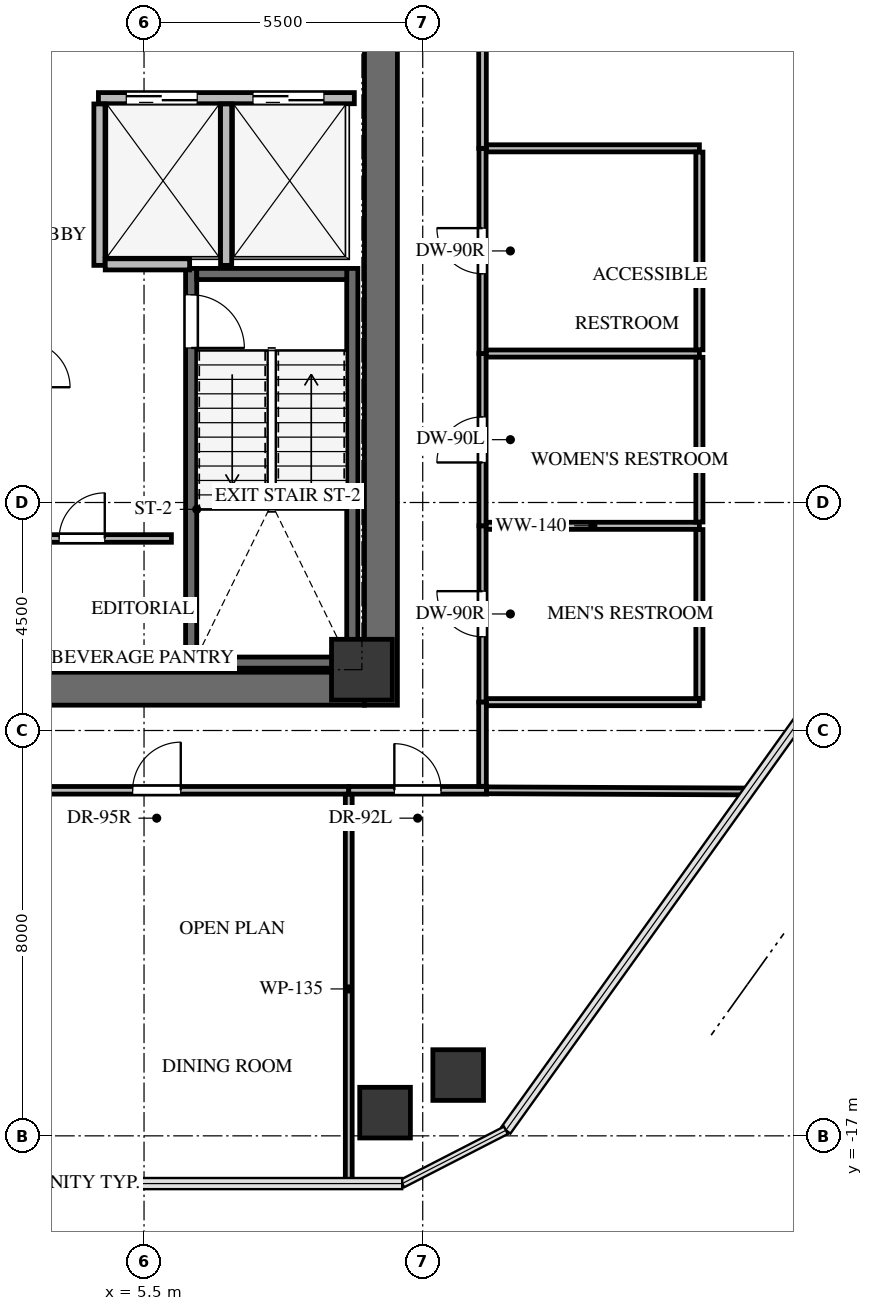
"""IFC4 building model, lengths in metres.
Left out: names, types, materials, properties, quantities, classifications, styles, units other than length and angle.
Written with IfcOpenShell. Run it as: python <this file> out.ifc"""

import sys

from ifc_helpers import new_model, si_unit, direction, frame, frame_2d, origin, origin_2d, place, context, subcontext, project, spatial, rectangle, extrude, source, transform, mapped, element, fill, save


model = new_model("IFC4")
c1 = context("Model", 3, precision=1e-05, world=origin(), true_north=direction((0.0, 1.0)))
c2 = subcontext(c1, "Body", "Model", "MODEL_VIEW")
j1 = project(units=[si_unit("LENGTHUNIT", "METRE"), si_unit("PLANEANGLEUNIT", "RADIAN")], contexts=[c1])
p1 = place(None, origin())
s1 = spatial("IfcSite", under=j1, at=p1, CompositionType="ELEMENT")
p2 = place(p1, origin())
s2 = spatial("IfcBuilding", under=s1, at=p2, CompositionType="ELEMENT")
p3 = place(p2, frame((0.0, 0.0, 155.1)))
s3 = spatial("IfcBuildingStorey", under=s2, at=p3, CompositionType="ELEMENT", Elevation=155.1)
p4 = place(p3, frame((10.175, -8.5, 0.0), z_axis=(0.0, 0.0, 1.0), x_axis=(0.0, 1.0, 0.0)))
e1 = element("IfcWall", 1, at=p4, inside=s3, PredefinedType="SHEAR", context=c2, shape_type="SweptSolid", body=[
    extrude(rectangle(XDim=17.0, YDim=0.65, at=frame_2d((8.5, 0.0))), origin(), (0.0, 0.0, 1.0), 4.2),
])
p5 = place(p3, frame((2.1, -8.175, 0.0), z_axis=(0.0, 0.0, 1.0), x_axis=(1.0, 0.0, 0.0)))
e2 = element("IfcWall", 2, at=p5, inside=s3, PredefinedType="SHEAR", context=c2, shape_type="SweptSolid", body=[
    extrude(rectangle(XDim=7.75, YDim=0.65, at=frame_2d((3.875, 0.0))), origin(), (0.0, 0.0, 1.0), 4.2),
])
p6 = place(p3, frame((9.61, -7.77, -0.32), z_axis=(0.0, 0.0, 1.0), x_axis=(0.0, 1.0, 0.0)))
e3 = element("IfcWall", 3, at=p6, inside=s3, PredefinedType="SHEAR", context=c2, shape_type="SweptSolid", body=[
    extrude(rectangle(XDim=7.89, YDim=0.22, at=frame_2d((3.945, 0.0))), origin(), (0.0, 0.0, 1.0), 4.28),
])
p7 = place(p3, frame((6.43, 0.12, -0.32), z_axis=(0.0, 0.0, 1.0), x_axis=(0.0, -1.0, 0.0)))
e4 = element("IfcWall", 4, at=p7, inside=s3, PredefinedType="SHEAR", context=c2, shape_type="SweptSolid", body=[
    extrude(rectangle(XDim=7.89, YDim=0.22, at=frame_2d((3.945, 0.0))), origin(), (0.0, 0.0, 1.0), 4.28),
])
p8 = place(p7, frame((0.52, 0.0, 0.0)))
e5 = element("IfcOpeningElement", 5, at=p8, cuts=e4, PredefinedType="OPENING", context=c2, shape_type="SweptSolid", body=[
    extrude(rectangle(XDim=1.05, YDim=2.15, at=frame_2d((0.525, 1.075))), frame((0.0, 0.12, 0.0), z_axis=(0.0, -1.0, 0.0), x_axis=(1.0, 0.0, 0.0)), (0.0, 0.0, 1.0), 0.24),
])
for number, where, z_axis, x_axis in (
    (6, (6.54, -7.66, -0.32), (0.0, 0.0, 1.0), (1.0, 0.0, 0.0)),
    (7, (9.5, 0.01, -0.32), (0.0, 0.0, 1.0), (-1.0, 0.0, 0.0)),
):
    element("IfcWall", number, at=place(p3, frame(where, z_axis=z_axis, x_axis=x_axis)), inside=s3, PredefinedType="SHEAR", context=c2, shape_type="SweptSolid", body=[
        extrude(rectangle(XDim=2.96, YDim=0.22, at=frame_2d((1.48, 0.0))), origin(), (0.0, 0.0, 1.0), 4.28),
    ])
m1 = source(origin(), c2, "Body", "SweptSolid", [
    extrude(rectangle(XDim=1.2, YDim=1.2, at=origin_2d()), origin(), (0.0, 0.0, 1.0), 4.28),
])
p9 = place(p3, frame((9.8, -7.8, -0.32), z_axis=(0.0, 0.0, 1.0), x_axis=(1.0, 0.0, 0.0)))
e8 = element("IfcColumn", 8, at=p9, inside=s3, PredefinedType="COLUMN", context=c2, shape_type="MappedRepresentation", body=[
    mapped(m1, transform((0.0, 0.0, 0.0), x_axis=(1.0, 0.0, 0.0), y_axis=(0.0, 1.0, 0.0), z_axis=(0.0, 0.0, 1.0), scale=1.0)),
])
m2 = source(origin(), c2, "Body", "SweptSolid", [
    extrude(rectangle(XDim=1.0, YDim=1.0, at=origin_2d()), origin(), (0.0, 0.0, 1.0), 4.28),
])
for number, where, z_axis, x_axis in (
    (9, (11.7, -15.8, -0.32), (0.0, 0.0, 1.0), (1.0, 0.0, 0.0)),
    (10, (10.257, -16.542, -0.32), (0.0, 0.0, 1.0), (1.0, 0.0, 0.0)),
):
    element("IfcColumn", number, at=place(p3, frame(where, z_axis=z_axis, x_axis=x_axis)), inside=s3, PredefinedType="COLUMN", context=c2, shape_type="MappedRepresentation", body=[
        mapped(m2, transform((0.0, 0.0, 0.0), x_axis=(1.0, 0.0, 0.0), y_axis=(0.0, 1.0, 0.0), z_axis=(0.0, 0.0, 1.0), scale=1.0)),
    ])
p10 = place(p3, frame((4.6, 3.48, 0.0), z_axis=(0.0, 0.0, 1.0), x_axis=(1.0, 0.0, 0.0)))
e11 = element("IfcWall", 11, at=p10, inside=s3, PredefinedType="SOLIDWALL", context=c2, shape_type="SweptSolid", body=[
    extrude(rectangle(XDim=5.05, YDim=0.22, at=frame_2d((2.525, 0.0))), origin(), (0.0, 0.0, 1.0), 3.945),
])
p11 = place(p10, frame((0.55, 0.0, 0.0)))
e12 = element("IfcOpeningElement", 12, at=p11, cuts=e11, PredefinedType="OPENING", context=c2, shape_type="SweptSolid", body=[
    extrude(rectangle(XDim=1.4, YDim=2.15, at=frame_2d((0.7, 1.075))), frame((0.0, 0.12, 0.0), z_axis=(0.0, -1.0, 0.0), x_axis=(1.0, 0.0, 0.0)), (0.0, 0.0, 1.0), 0.24),
])
p12 = place(p10, frame((3.05, 0.0, 0.0)))
e13 = element("IfcOpeningElement", 13, at=p12, cuts=e11, PredefinedType="OPENING", context=c2, shape_type="SweptSolid", body=[
    extrude(rectangle(XDim=1.4, YDim=2.15, at=frame_2d((0.7, 1.075))), frame((0.0, 0.12, 0.0), z_axis=(0.0, -1.0, 0.0), x_axis=(1.0, 0.0, 0.0)), (0.0, 0.0, 1.0), 0.24),
])
for number, where, z_axis, x_axis in (
    (14, (4.62, 0.18, 0.0), (0.0, 0.0, 1.0), (0.0, 1.0, 0.0)),
    (15, (7.12, 0.18, 0.0), (0.0, 0.0, 1.0), (0.0, 1.0, 0.0)),
):
    element("IfcWall", number, at=place(p3, frame(where, z_axis=z_axis, x_axis=x_axis)), inside=s3, PredefinedType="SOLIDWALL", context=c2, shape_type="SweptSolid", body=[
        extrude(rectangle(XDim=3.186, YDim=0.22, at=frame_2d((1.593, 0.0))), origin(), (0.0, 0.0, 1.0), 3.945),
    ])
p13 = place(p3, frame((4.734, 0.2, 0.0), z_axis=(0.0, 0.0, 1.0), x_axis=(1.0, 0.0, 0.0)))
e16 = element("IfcWall", 16, at=p13, inside=s3, PredefinedType="SOLIDWALL", context=c2, shape_type="SweptSolid", body=[
    extrude(rectangle(XDim=1.666, YDim=0.22, at=frame_2d((0.833, 0.0))), origin(), (0.0, 0.0, 1.0), 3.945),
])
p14 = place(p3, frame((2.51, -5.21, 0.0), z_axis=(0.0, 0.0, 1.0), x_axis=(1.0, 0.0, 0.0)))
e17 = element("IfcWall", 17, at=p14, inside=s3, PredefinedType="PARTITIONING", context=c2, shape_type="SweptSolid", body=[
    extrude(rectangle(XDim=3.53, YDim=0.15, at=frame_2d((1.765, 0.0))), origin(), (0.0, 0.0, 1.0), 3.945),
])
p15 = place(p14, frame((1.315, 0.0, 0.0)))
e18 = element("IfcOpeningElement", 18, at=p15, cuts=e17, PredefinedType="OPENING", context=c2, shape_type="SweptSolid", body=[
    extrude(rectangle(XDim=0.9, YDim=2.05, at=frame_2d((0.45, 1.025))), frame((0.0, 0.085, 0.0), z_axis=(0.0, -1.0, 0.0), x_axis=(1.0, 0.0, 0.0)), (0.0, 0.0, 1.0), 0.17),
])
p16 = place(p3, frame((12.18, -8.44, 0.0), z_axis=(0.0, 0.0, 1.0), x_axis=(0.0, 1.0, 0.0)))
e19 = element("IfcWall", 19, at=p16, inside=s3, PredefinedType="PARTITIONING", context=c2, shape_type="SweptSolid", body=[
    extrude(rectangle(XDim=3.48, YDim=0.14, at=frame_2d((1.74, 0.0))), origin(), (0.0, 0.0, 1.0), 3.945),
])
p17 = place(p16, frame((1.29, 0.0, 0.0)))
e20 = element("IfcOpeningElement", 20, at=p17, cuts=e19, PredefinedType="OPENING", context=c2, shape_type="SweptSolid", body=[
    extrude(rectangle(XDim=0.9, YDim=2.05, at=frame_2d((0.45, 1.025))), frame((0.0, 0.08, 0.0), z_axis=(0.0, -1.0, 0.0), x_axis=(1.0, 0.0, 0.0)), (0.0, 0.0, 1.0), 0.16),
])
p18 = place(p3, frame((12.18, -4.96, 0.0), z_axis=(0.0, 0.0, 1.0), x_axis=(0.0, 1.0, 0.0)))
e21 = element("IfcWall", 21, at=p18, inside=s3, PredefinedType="PARTITIONING", context=c2, shape_type="SweptSolid", body=[
    extrude(rectangle(XDim=3.4, YDim=0.14, at=frame_2d((1.7, 0.0))), origin(), (0.0, 0.0, 1.0), 3.945),
])
p19 = place(p18, frame((1.25, 0.0, 0.0)))
e22 = element("IfcOpeningElement", 22, at=p19, cuts=e21, PredefinedType="OPENING", context=c2, shape_type="SweptSolid", body=[
    extrude(rectangle(XDim=0.9, YDim=2.05, at=frame_2d((0.45, 1.025))), frame((0.0, 0.08, 0.0), z_axis=(0.0, -1.0, 0.0), x_axis=(1.0, 0.0, 0.0)), (0.0, 0.0, 1.0), 0.16),
])
p20 = place(p3, frame((12.18, -1.56, 0.0), z_axis=(0.0, 0.0, 1.0), x_axis=(0.0, 1.0, 0.0)))
e23 = element("IfcWall", 23, at=p20, inside=s3, PredefinedType="PARTITIONING", context=c2, shape_type="SweptSolid", body=[
    extrude(rectangle(XDim=4.05, YDim=0.14, at=frame_2d((2.025, 0.0))), origin(), (0.0, 0.0, 1.0), 3.142),
])
p21 = place(p20, frame((1.575, 0.0, 0.0)))
e24 = element("IfcOpeningElement", 24, at=p21, cuts=e23, PredefinedType="OPENING", context=c2, shape_type="SweptSolid", body=[
    extrude(rectangle(XDim=0.9, YDim=2.05, at=frame_2d((0.45, 1.025))), frame((0.0, 0.08, 0.0), z_axis=(0.0, -1.0, 0.0), x_axis=(1.0, 0.0, 0.0)), (0.0, 0.0, 1.0), 0.16),
])
p22 = place(p3, frame((1.96, -10.18, 0.0), z_axis=(0.0, 0.0, 1.0), x_axis=(1.0, 0.0, 0.0)))
e25 = element("IfcWall", 25, at=p22, inside=s3, PredefinedType="PARTITIONING", context=c2, shape_type="SweptSolid", body=[
    extrude(rectangle(XDim=7.58, YDim=0.15, at=frame_2d((3.79, 0.0))), origin(), (0.0, 0.0, 1.0), 3.142),
])
p23 = place(p22, frame((3.315, 0.0, 0.0)))
e26 = element("IfcOpeningElement", 26, at=p23, cuts=e25, PredefinedType="OPENING", context=c2, shape_type="SweptSolid", body=[
    extrude(rectangle(XDim=0.95, YDim=2.1, at=frame_2d((0.475, 1.05))), frame((0.0, 0.085, 0.0), z_axis=(0.0, -1.0, 0.0), x_axis=(1.0, 0.0, 0.0)), (0.0, 0.0, 1.0), 0.17),
])
p24 = place(p3, frame((9.54, -10.18, 0.0), z_axis=(0.0, 0.0, 1.0), x_axis=(1.0, 0.0, 0.0)))
e27 = element("IfcWall", 27, at=p24, inside=s3, PredefinedType="PARTITIONING", context=c2, shape_type="SweptSolid", body=[
    extrude(rectangle(XDim=2.72, YDim=0.15, at=frame_2d((1.36, 0.0))), origin(), (0.0, 0.0, 1.0), 3.945),
])
p25 = place(p24, frame((0.9, 0.0, 0.0)))
e28 = element("IfcOpeningElement", 28, at=p25, cuts=e27, PredefinedType="OPENING", context=c2, shape_type="SweptSolid", body=[
    extrude(rectangle(XDim=0.92, YDim=2.1, at=frame_2d((0.46, 1.05))), frame((0.0, 0.085, 0.0), z_axis=(0.0, -1.0, 0.0), x_axis=(1.0, 0.0, 0.0)), (0.0, 0.0, 1.0), 0.17),
])
p26 = place(p3, frame((12.18, 2.49, 0.0), z_axis=(0.0, 0.0, 1.0), x_axis=(0.0, 1.0, 0.0)))
e29 = element("IfcWall", 29, at=p26, inside=s3, PredefinedType="PARTITIONING", context=c2, shape_type="SweptSolid", body=[
    extrude(rectangle(XDim=7.611, YDim=0.15, at=frame_2d((3.806, 0.0))), origin(), (0.0, 0.0, 1.0), 3.945),
])
p27 = place(p26, frame((3.331, 0.0, 0.0)))
e30 = element("IfcOpeningElement", 30, at=p27, cuts=e29, PredefinedType="OPENING", context=c2, shape_type="SweptSolid", body=[
    extrude(rectangle(XDim=0.95, YDim=2.1, at=frame_2d((0.475, 1.05))), frame((0.0, 0.085, 0.0), z_axis=(0.0, -1.0, 0.0), x_axis=(1.0, 0.0, 0.0)), (0.0, 0.0, 1.0), 0.17),
])
p28 = place(p3, frame((12.18, -10.101, 0.0), z_axis=(0.0, 0.0, 1.0), x_axis=(0.0, 1.0, 0.0)))
e31 = element("IfcWall", 31, at=p28, inside=s3, PredefinedType="PARTITIONING", context=c2, shape_type="SweptSolid", body=[
    extrude(rectangle(XDim=1.661, YDim=0.15, at=frame_2d((0.831, 0.0))), origin(), (0.0, 0.0, 1.0), 3.945),
])
p29 = place(p3, frame((12.254, -4.96, 0.0), z_axis=(0.0, 0.0, 1.0), x_axis=(1.0, 0.0, 0.0)))
e32 = element("IfcWall", 32, at=p29, inside=s3, PredefinedType="PARTITIONING", context=c2, shape_type="SweptSolid", body=[
    extrude(rectangle(XDim=4.206, YDim=0.14, at=frame_2d((2.103, 0.0))), origin(), (0.0, 0.0, 1.0), 3.945),
])
p30 = place(p3, frame((16.46, -8.44, 0.0), z_axis=(0.0, 0.0, 1.0), x_axis=(-1.0, 0.0, 0.0)))
e33 = element("IfcWall", 33, at=p30, inside=s3, PredefinedType="PARTITIONING", context=c2, shape_type="SweptSolid", body=[
    extrude(rectangle(XDim=4.201, YDim=0.14, at=frame_2d((2.101, 0.0))), origin(), (0.0, 0.0, 1.0), 3.945),
])
p31 = place(p3, frame((16.46, -5.034, 0.0), z_axis=(0.0, 0.0, 1.0), x_axis=(0.0, -1.0, 0.0)))
e34 = element("IfcWall", 34, at=p31, inside=s3, PredefinedType="PARTITIONING", context=c2, shape_type="SweptSolid", body=[
    extrude(rectangle(XDim=3.332, YDim=0.14, at=frame_2d((1.666, 0.0))), origin(), (0.0, 0.0, 1.0), 3.945),
])
p32 = place(p3, frame((12.254, -1.56, 0.0), z_axis=(0.0, 0.0, 1.0), x_axis=(1.0, 0.0, 0.0)))
e35 = element("IfcWall", 35, at=p32, inside=s3, PredefinedType="PARTITIONING", context=c2, shape_type="SweptSolid", body=[
    extrude(rectangle(XDim=4.206, YDim=0.14, at=frame_2d((2.103, 0.0))), origin(), (0.0, 0.0, 1.0), 3.945),
])
p33 = place(p3, frame((16.46, -1.634, 0.0), z_axis=(0.0, 0.0, 1.0), x_axis=(0.0, -1.0, 0.0)))
e36 = element("IfcWall", 36, at=p33, inside=s3, PredefinedType="PARTITIONING", context=c2, shape_type="SweptSolid", body=[
    extrude(rectangle(XDim=3.252, YDim=0.14, at=frame_2d((1.626, 0.0))), origin(), (0.0, 0.0, 1.0), 3.945),
])
p34 = place(p3, frame((12.259, 2.49, 0.0), z_axis=(0.0, 0.0, 1.0), x_axis=(1.0, 0.0, 0.0)))
e37 = element("IfcWall", 37, at=p34, inside=s3, PredefinedType="PARTITIONING", context=c2, shape_type="SweptSolid", body=[
    extrude(rectangle(XDim=4.201, YDim=0.14, at=frame_2d((2.101, 0.0))), origin(), (0.0, 0.0, 1.0), 3.945),
])
p35 = place(p3, frame((16.46, 2.416, 0.0), z_axis=(0.0, 0.0, 1.0), x_axis=(0.0, -1.0, 0.0)))
e38 = element("IfcWall", 38, at=p35, inside=s3, PredefinedType="PARTITIONING", context=c2, shape_type="SweptSolid", body=[
    extrude(rectangle(XDim=3.902, YDim=0.14, at=frame_2d((1.951, 0.0))), origin(), (0.0, 0.0, 1.0), 3.142),
])
p36 = place(p3, frame((9.54, -10.259, 0.0), z_axis=(0.0, 0.0, 1.0), x_axis=(0.0, -1.0, 0.0)))
e39 = element("IfcWall", 39, at=p36, inside=s3, PredefinedType="PARTITIONING", context=c2, shape_type="SweptSolid", body=[
    extrude(rectangle(XDim=7.683, YDim=0.135, at=frame_2d((3.841, 0.0))), origin(), (0.0, 0.0, 1.0), 3.142),
])
p37 = place(p3, frame((12.26, -10.18, 0.0), z_axis=(0.0, 0.0, 1.0), x_axis=(0.999990144117, -0.004439782427, 0.0)))
e40 = element("IfcWall", 40, at=p37, inside=s3, PredefinedType="PARTITIONING", context=c2, shape_type="SweptSolid", body=[
    extrude(rectangle(XDim=5.169, YDim=0.135, at=frame_2d((2.584, 0.0))), origin(), (0.0, 0.0, 1.0), 3.299),
])
m3 = source(origin(), c2, "Body", "SweptSolid", [
    extrude(rectangle(XDim=1.05, YDim=2.15, at=frame_2d((0.525, 1.075))), frame((0.0, 0.025, 0.0), z_axis=(0.0, -1.0, 0.0), x_axis=(1.0, 0.0, 0.0)), (0.0, 0.0, 1.0), 0.05),
])
p38 = place(p8, origin())
e41 = element("IfcDoor", 41, at=p38, inside=s3, OperationType="SINGLE_SWING_RIGHT", PredefinedType="DOOR", context=c2, shape_type="MappedRepresentation", body=[
    mapped(m3, transform((0.0, 0.0, 0.0), x_axis=(1.0, 0.0, 0.0), y_axis=(0.0, 1.0, 0.0), z_axis=(0.0, 0.0, 1.0), scale=1.0)),
])
fill(e5, e41)
m4 = source(origin(), c2, "Body", "SweptSolid", [
    extrude(rectangle(XDim=1.4, YDim=2.15, at=frame_2d((0.7, 1.075))), frame((0.0, 0.025, 0.0), z_axis=(0.0, -1.0, 0.0), x_axis=(1.0, 0.0, 0.0)), (0.0, 0.0, 1.0), 0.05),
])
p39 = place(p11, origin())
e42 = element("IfcDoor", 42, at=p39, inside=s3, OperationType="DOUBLE_DOOR_SLIDING", PredefinedType="DOOR", context=c2, shape_type="MappedRepresentation", body=[
    mapped(m4, transform((0.0, 0.0, 0.0), x_axis=(1.0, 0.0, 0.0), y_axis=(0.0, 1.0, 0.0), z_axis=(0.0, 0.0, 1.0), scale=1.0)),
])
fill(e12, e42)
p40 = place(p12, origin())
e43 = element("IfcDoor", 43, at=p40, inside=s3, OperationType="DOUBLE_DOOR_SLIDING", PredefinedType="DOOR", context=c2, shape_type="MappedRepresentation", body=[
    mapped(m4, transform((0.0, 0.0, 0.0), x_axis=(1.0, 0.0, 0.0), y_axis=(0.0, 1.0, 0.0), z_axis=(0.0, 0.0, 1.0), scale=1.0)),
])
fill(e13, e43)
m5 = source(origin(), c2, "Body", "SweptSolid", [
    extrude(rectangle(XDim=0.9, YDim=2.05, at=frame_2d((0.45, 1.025))), frame((0.0, 0.025, 0.0), z_axis=(0.0, -1.0, 0.0), x_axis=(1.0, 0.0, 0.0)), (0.0, 0.0, 1.0), 0.05),
])
p41 = place(p15, origin())
e44 = element("IfcDoor", 44, at=p41, inside=s3, OperationType="SINGLE_SWING_RIGHT", PredefinedType="DOOR", context=c2, shape_type="MappedRepresentation", body=[
    mapped(m5, transform((0.0, 0.0, 0.0), x_axis=(1.0, 0.0, 0.0), y_axis=(0.0, 1.0, 0.0), z_axis=(0.0, 0.0, 1.0), scale=1.0)),
])
fill(e18, e44)
m6 = source(origin(), c2, "Body", "SweptSolid", [
    extrude(rectangle(XDim=0.9, YDim=2.05, at=frame_2d((0.45, 1.025))), frame((0.0, 0.025, 0.0), z_axis=(0.0, -1.0, 0.0), x_axis=(1.0, 0.0, 0.0)), (0.0, 0.0, 1.0), 0.05),
])
p42 = place(p17, origin())
e45 = element("IfcDoor", 45, at=p42, inside=s3, OperationType="SINGLE_SWING_RIGHT", PredefinedType="DOOR", context=c2, shape_type="MappedRepresentation", body=[
    mapped(m6, transform((0.0, 0.0, 0.0), x_axis=(1.0, 0.0, 0.0), y_axis=(0.0, 1.0, 0.0), z_axis=(0.0, 0.0, 1.0), scale=1.0)),
])
fill(e20, e45)
m7 = source(origin(), c2, "Body", "SweptSolid", [
    extrude(rectangle(XDim=0.9, YDim=2.05, at=frame_2d((0.45, 1.025))), frame((0.0, 0.025, 0.0), z_axis=(0.0, -1.0, 0.0), x_axis=(1.0, 0.0, 0.0)), (0.0, 0.0, 1.0), 0.05),
])
p43 = place(p19, origin())
e46 = element("IfcDoor", 46, at=p43, inside=s3, OperationType="SINGLE_SWING_LEFT", PredefinedType="DOOR", context=c2, shape_type="MappedRepresentation", body=[
    mapped(m7, transform((0.0, 0.0, 0.0), x_axis=(1.0, 0.0, 0.0), y_axis=(0.0, 1.0, 0.0), z_axis=(0.0, 0.0, 1.0), scale=1.0)),
])
fill(e22, e46)
p44 = place(p21, origin())
e47 = element("IfcDoor", 47, at=p44, inside=s3, OperationType="SINGLE_SWING_RIGHT", PredefinedType="DOOR", context=c2, shape_type="MappedRepresentation", body=[
    mapped(m6, transform((0.0, 0.0, 0.0), x_axis=(1.0, 0.0, 0.0), y_axis=(0.0, 1.0, 0.0), z_axis=(0.0, 0.0, 1.0), scale=1.0)),
])
fill(e24, e47)
m8 = source(origin(), c2, "Body", "SweptSolid", [
    extrude(rectangle(XDim=0.95, YDim=2.1, at=frame_2d((0.475, 1.05))), frame((0.0, 0.025, 0.0), z_axis=(0.0, -1.0, 0.0), x_axis=(1.0, 0.0, 0.0)), (0.0, 0.0, 1.0), 0.05),
])
p45 = place(p23, origin())
e48 = element("IfcDoor", 48, at=p45, inside=s3, OperationType="SINGLE_SWING_RIGHT", PredefinedType="DOOR", context=c2, shape_type="MappedRepresentation", body=[
    mapped(m8, transform((0.0, 0.0, 0.0), x_axis=(1.0, 0.0, 0.0), y_axis=(0.0, 1.0, 0.0), z_axis=(0.0, 0.0, 1.0), scale=1.0)),
])
fill(e26, e48)
m9 = source(origin(), c2, "Body", "SweptSolid", [
    extrude(rectangle(XDim=0.92, YDim=2.1, at=frame_2d((0.46, 1.05))), frame((0.0, 0.025, 0.0), z_axis=(0.0, -1.0, 0.0), x_axis=(1.0, 0.0, 0.0)), (0.0, 0.0, 1.0), 0.05),
])
p46 = place(p25, origin())
e49 = element("IfcDoor", 49, at=p46, inside=s3, OperationType="SINGLE_SWING_LEFT", PredefinedType="DOOR", context=c2, shape_type="MappedRepresentation", body=[
    mapped(m9, transform((0.0, 0.0, 0.0), x_axis=(1.0, 0.0, 0.0), y_axis=(0.0, 1.0, 0.0), z_axis=(0.0, 0.0, 1.0), scale=1.0)),
])
fill(e28, e49)
save(model, sys.argv[1])
